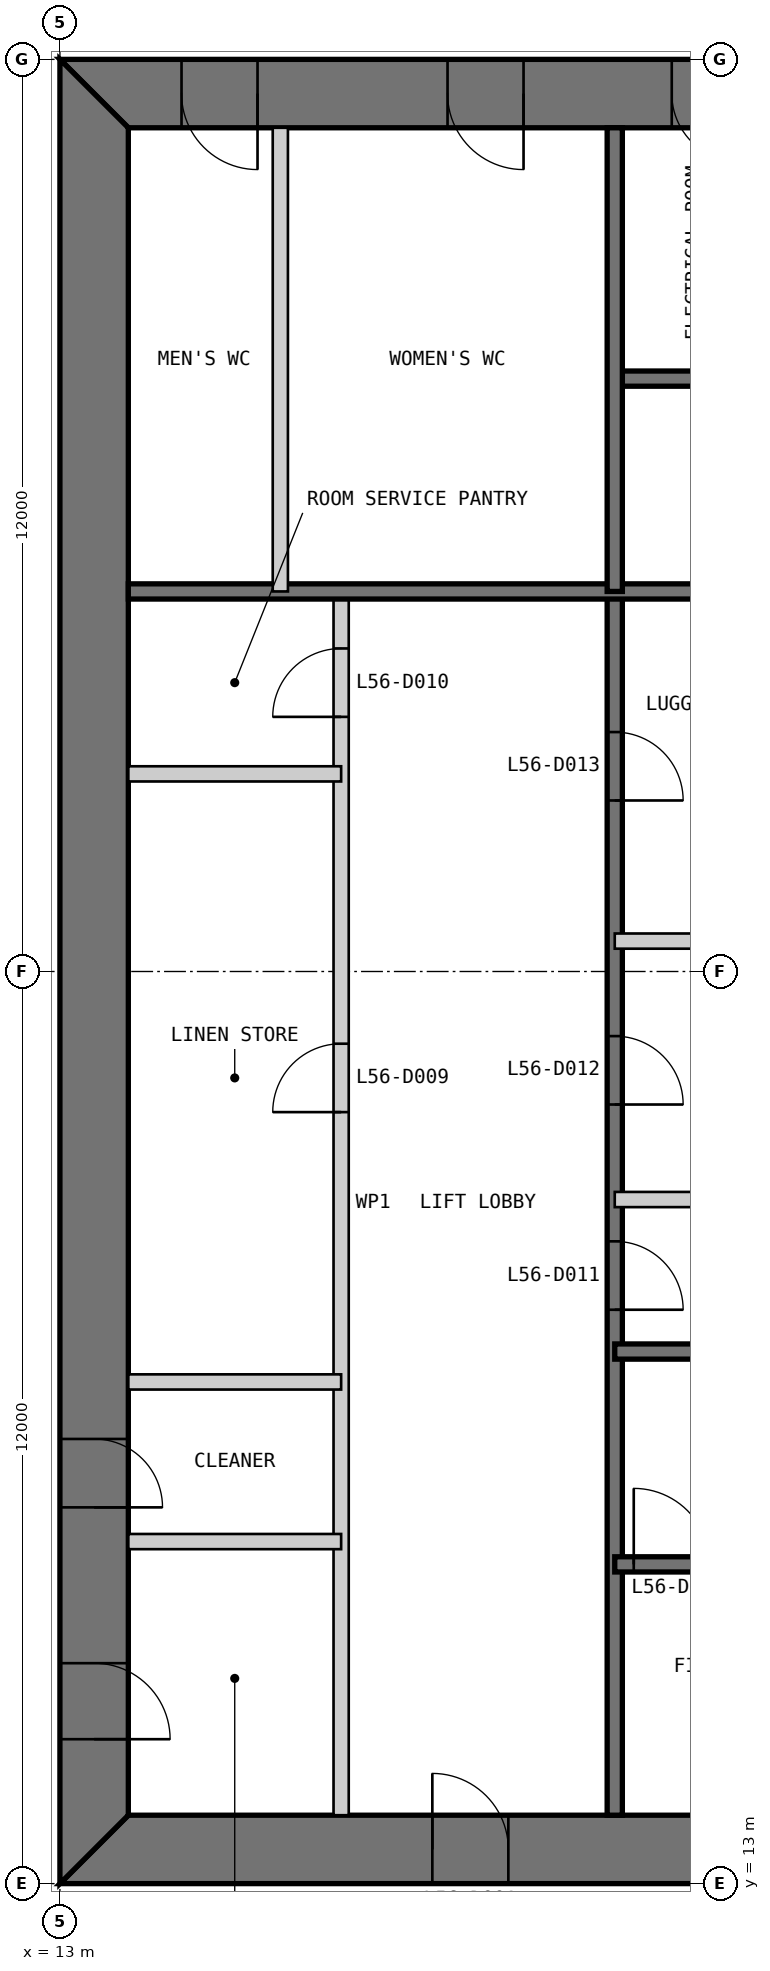
"""IFC4 building model, lengths in metres.
Left out: names, types, materials, properties, quantities, classifications, styles, units other than length and angle.
Written with IfcOpenShell. Run it as: python <this file> out.ifc"""

import sys

from ifc_helpers import new_model, si_unit, direction, frame, frame_2d, origin, place, context, subcontext, project, spatial, polyline, rectangle, outline, extrude, element, fill, save


model = new_model("IFC4")
c1 = context("Model", 3, precision=1e-05, world=origin(), true_north=direction((0.0, 1.0)))
c2 = subcontext(c1, "Body", "Model", "MODEL_VIEW")
j1 = project(units=[si_unit("LENGTHUNIT", "METRE"), si_unit("PLANEANGLEUNIT", "RADIAN")], contexts=[c1])
p1 = place(None, origin())
s1 = spatial("IfcSite", under=j1, at=p1, CompositionType="ELEMENT")
p2 = place(p1, origin())
s2 = spatial("IfcBuilding", under=s1, at=p2, CompositionType="ELEMENT")
p3 = place(p2, frame((0.0, 0.0, 239.8)))
s3 = spatial("IfcBuildingStorey", under=s2, at=p3, CompositionType="ELEMENT", Elevation=239.8)
p4 = place(p3, frame((13.0, 13.45, 0.0), z_axis=(0.0, 0.0, 1.0), x_axis=(1.0, 0.0, 0.0)))
e1 = element("IfcWall", 1, at=p4, inside=s3, PredefinedType="SHEAR", context=c2, shape_type="SweptSolid", body=[
    extrude(outline(polyline([(0.0, -0.45), (24.0, -0.45), (23.1, 0.45), (0.9, 0.45), (0.0, -0.45)])), origin(), (0.0, 0.0, 1.0), 6.0),
])
p5 = place(p4, frame((4.9, 0.0, 0.0)))
e2 = element("IfcOpeningElement", 2, at=p5, cuts=e1, PredefinedType="OPENING", context=c2, shape_type="SweptSolid", body=[
    extrude(rectangle(XDim=1.0, YDim=2.2, at=frame_2d((0.5, 1.1))), frame((0.0, 0.46, 0.0), z_axis=(0.0, -1.0, 0.0), x_axis=(1.0, 0.0, 0.0)), (0.0, 0.0, 1.0), 0.92),
])
p6 = place(p4, frame((8.9, 0.0, 0.0)))
e3 = element("IfcOpeningElement", 3, at=p6, cuts=e1, PredefinedType="OPENING", context=c2, shape_type="SweptSolid", body=[
    extrude(rectangle(XDim=1.1, YDim=2.2, at=frame_2d((0.55, 1.1))), frame((0.0, 0.46, 0.0), z_axis=(0.0, -1.0, 0.0), x_axis=(1.0, 0.0, 0.0)), (0.0, 0.0, 1.0), 0.92),
])
p7 = place(p4, frame((15.05, 0.0, 0.0)))
e4 = element("IfcOpeningElement", 4, at=p7, cuts=e1, PredefinedType="OPENING", context=c2, shape_type="SweptSolid", body=[
    extrude(rectangle(XDim=0.9, YDim=2.2, at=frame_2d((0.45, 1.1))), frame((0.0, 0.46, 0.0), z_axis=(0.0, -1.0, 0.0), x_axis=(1.0, 0.0, 0.0)), (0.0, 0.0, 1.0), 0.92),
])
p8 = place(p4, frame((17.9, 0.0, 0.0)))
e5 = element("IfcOpeningElement", 5, at=p8, cuts=e1, PredefinedType="OPENING", context=c2, shape_type="SweptSolid", body=[
    extrude(rectangle(XDim=1.0, YDim=2.2, at=frame_2d((0.5, 1.1))), frame((0.0, 0.46, 0.0), z_axis=(0.0, -1.0, 0.0), x_axis=(1.0, 0.0, 0.0)), (0.0, 0.0, 1.0), 0.92),
])
p9 = place(p4, frame((21.4, 0.0, 0.0)))
e6 = element("IfcOpeningElement", 6, at=p9, cuts=e1, PredefinedType="OPENING", context=c2, shape_type="SweptSolid", body=[
    extrude(rectangle(XDim=1.0, YDim=2.2, at=frame_2d((0.5, 1.1))), frame((0.0, 0.46, 0.0), z_axis=(0.0, -1.0, 0.0), x_axis=(1.0, 0.0, 0.0)), (0.0, 0.0, 1.0), 0.92),
])
p10 = place(p3, frame((37.0, 36.55, 0.0), z_axis=(0.0, 0.0, 1.0), x_axis=(-1.0, 0.0, 0.0)))
e7 = element("IfcWall", 7, at=p10, inside=s3, PredefinedType="SHEAR", context=c2, shape_type="SweptSolid", body=[
    extrude(outline(polyline([(0.0, -0.45), (24.0, -0.45), (23.1, 0.45), (0.9, 0.45), (0.0, -0.45)])), origin(), (0.0, 0.0, 1.0), 6.0),
])
p11 = place(p10, frame((4.9, 0.0, 0.0)))
e8 = element("IfcOpeningElement", 8, at=p11, cuts=e7, PredefinedType="OPENING", context=c2, shape_type="SweptSolid", body=[
    extrude(rectangle(XDim=1.0, YDim=2.2, at=frame_2d((0.5, 1.1))), frame((0.0, 0.46, 0.0), z_axis=(0.0, -1.0, 0.0), x_axis=(1.0, 0.0, 0.0)), (0.0, 0.0, 1.0), 0.92),
])
p12 = place(p10, frame((8.9, 0.0, 0.0)))
e9 = element("IfcOpeningElement", 9, at=p12, cuts=e7, PredefinedType="OPENING", context=c2, shape_type="SweptSolid", body=[
    extrude(rectangle(XDim=1.1, YDim=2.2, at=frame_2d((0.55, 1.1))), frame((0.0, 0.46, 0.0), z_axis=(0.0, -1.0, 0.0), x_axis=(1.0, 0.0, 0.0)), (0.0, 0.0, 1.0), 0.92),
])
p13 = place(p10, frame((15.05, 0.0, 0.0)))
e10 = element("IfcOpeningElement", 10, at=p13, cuts=e7, PredefinedType="OPENING", context=c2, shape_type="SweptSolid", body=[
    extrude(rectangle(XDim=0.9, YDim=2.2, at=frame_2d((0.45, 1.1))), frame((0.0, 0.46, 0.0), z_axis=(0.0, -1.0, 0.0), x_axis=(1.0, 0.0, 0.0)), (0.0, 0.0, 1.0), 0.92),
])
p14 = place(p10, frame((17.9, 0.0, 0.0)))
e11 = element("IfcOpeningElement", 11, at=p14, cuts=e7, PredefinedType="OPENING", context=c2, shape_type="SweptSolid", body=[
    extrude(rectangle(XDim=1.0, YDim=2.2, at=frame_2d((0.5, 1.1))), frame((0.0, 0.46, 0.0), z_axis=(0.0, -1.0, 0.0), x_axis=(1.0, 0.0, 0.0)), (0.0, 0.0, 1.0), 0.92),
])
p15 = place(p10, frame((21.4, 0.0, 0.0)))
e12 = element("IfcOpeningElement", 12, at=p15, cuts=e7, PredefinedType="OPENING", context=c2, shape_type="SweptSolid", body=[
    extrude(rectangle(XDim=1.0, YDim=2.2, at=frame_2d((0.5, 1.1))), frame((0.0, 0.46, 0.0), z_axis=(0.0, -1.0, 0.0), x_axis=(1.0, 0.0, 0.0)), (0.0, 0.0, 1.0), 0.92),
])
p16 = place(p3, frame((13.45, 36.1, 0.0), z_axis=(0.0, 0.0, 1.0), x_axis=(0.0, -1.0, 0.0)))
e13 = element("IfcWall", 13, at=p16, inside=s3, PredefinedType="SHEAR", context=c2, shape_type="SweptSolid", body=[
    extrude(outline(polyline([(-0.9, -0.45), (23.1, -0.45), (22.2, 0.45), (0.0, 0.45), (-0.9, -0.45)])), origin(), (0.0, 0.0, 1.0), 6.0),
])
p17 = place(p16, frame((20.2, 0.0, 0.0)))
e14 = element("IfcOpeningElement", 14, at=p17, cuts=e13, PredefinedType="OPENING", context=c2, shape_type="SweptSolid", body=[
    extrude(rectangle(XDim=1.0, YDim=2.2, at=frame_2d((0.5, 1.1))), frame((0.0, 0.46, 0.0), z_axis=(0.0, -1.0, 0.0), x_axis=(1.0, 0.0, 0.0)), (0.0, 0.0, 1.0), 0.92),
])
p18 = place(p16, frame((17.25, 0.0, 0.0)))
e15 = element("IfcOpeningElement", 15, at=p18, cuts=e13, PredefinedType="OPENING", context=c2, shape_type="SweptSolid", body=[
    extrude(rectangle(XDim=0.9, YDim=2.2, at=frame_2d((0.45, 1.1))), frame((0.0, 0.46, 0.0), z_axis=(0.0, -1.0, 0.0), x_axis=(1.0, 0.0, 0.0)), (0.0, 0.0, 1.0), 0.92),
])
p19 = place(p3, frame((16.7, 13.9, 0.0), z_axis=(0.0, 0.0, 1.0), x_axis=(0.0, 1.0, 0.0)))
e16 = element("IfcWall", 16, at=p19, inside=s3, PredefinedType="PARTITIONING", context=c2, shape_type="SweptSolid", body=[
    extrude(rectangle(XDim=16.1, YDim=0.2, at=frame_2d((8.05, 0.0))), origin(), (0.0, 0.0, 1.0), 5.8),
])
p20 = place(p19, frame((9.25, 0.0, 0.0)))
e17 = element("IfcOpeningElement", 17, at=p20, cuts=e16, PredefinedType="OPENING", context=c2, shape_type="SweptSolid", body=[
    extrude(rectangle(XDim=0.9, YDim=2.2, at=frame_2d((0.45, 1.1))), frame((0.0, 0.11, 0.0), z_axis=(0.0, -1.0, 0.0), x_axis=(1.0, 0.0, 0.0)), (0.0, 0.0, 1.0), 0.22),
])
p21 = place(p19, frame((14.45, 0.0, 0.0)))
e18 = element("IfcOpeningElement", 18, at=p21, cuts=e16, PredefinedType="OPENING", context=c2, shape_type="SweptSolid", body=[
    extrude(rectangle(XDim=0.9, YDim=2.2, at=frame_2d((0.45, 1.1))), frame((0.0, 0.11, 0.0), z_axis=(0.0, -1.0, 0.0), x_axis=(1.0, 0.0, 0.0)), (0.0, 0.0, 1.0), 0.22),
])
p22 = place(p3, frame((20.3, 13.9, 0.0), z_axis=(0.0, 0.0, 1.0), x_axis=(0.0, 1.0, 0.0)))
e19 = element("IfcWall", 19, at=p22, inside=s3, PredefinedType="SOLIDWALL", context=c2, shape_type="SweptSolid", body=[
    extrude(rectangle(XDim=16.1, YDim=0.2, at=frame_2d((8.05, 0.0))), origin(), (0.0, 0.0, 1.0), 5.8),
])
p23 = place(p22, frame((6.65, 0.0, 0.0)))
e20 = element("IfcOpeningElement", 20, at=p23, cuts=e19, PredefinedType="OPENING", context=c2, shape_type="SweptSolid", body=[
    extrude(rectangle(XDim=0.9, YDim=2.2, at=frame_2d((0.45, 1.1))), frame((0.0, 0.11, 0.0), z_axis=(0.0, -1.0, 0.0), x_axis=(1.0, 0.0, 0.0)), (0.0, 0.0, 1.0), 0.22),
])
p24 = place(p22, frame((9.35, 0.0, 0.0)))
e21 = element("IfcOpeningElement", 21, at=p24, cuts=e19, PredefinedType="OPENING", context=c2, shape_type="SweptSolid", body=[
    extrude(rectangle(XDim=0.9, YDim=2.2, at=frame_2d((0.45, 1.1))), frame((0.0, 0.11, 0.0), z_axis=(0.0, -1.0, 0.0), x_axis=(1.0, 0.0, 0.0)), (0.0, 0.0, 1.0), 0.22),
])
p25 = place(p22, frame((13.35, 0.0, 0.0)))
e22 = element("IfcOpeningElement", 22, at=p25, cuts=e19, PredefinedType="OPENING", context=c2, shape_type="SweptSolid", body=[
    extrude(rectangle(XDim=0.9, YDim=2.2, at=frame_2d((0.45, 1.1))), frame((0.0, 0.11, 0.0), z_axis=(0.0, -1.0, 0.0), x_axis=(1.0, 0.0, 0.0)), (0.0, 0.0, 1.0), 0.22),
])
p26 = place(p3, frame((20.3, 17.2, 0.0), z_axis=(0.0, 0.0, 1.0), x_axis=(1.0, 0.0, 0.0)))
e23 = element("IfcWall", 23, at=p26, inside=s3, PredefinedType="SOLIDWALL", context=c2, shape_type="SweptSolid", body=[
    extrude(rectangle(XDim=9.4, YDim=0.2, at=frame_2d((4.7, 0.0))), origin(), (0.0, 0.0, 1.0), 5.8),
])
p27 = place(p26, frame((0.25, 0.0, 0.0)))
e24 = element("IfcOpeningElement", 24, at=p27, cuts=e23, PredefinedType="OPENING", context=c2, shape_type="SweptSolid", body=[
    extrude(rectangle(XDim=1.0, YDim=2.2, at=frame_2d((0.5, 1.1))), frame((0.0, 0.11, 0.0), z_axis=(0.0, -1.0, 0.0), x_axis=(1.0, 0.0, 0.0)), (0.0, 0.0, 1.0), 0.22),
])
p28 = place(p3, frame((20.3, 20.0, 0.0), z_axis=(0.0, 0.0, 1.0), x_axis=(1.0, 0.0, 0.0)))
e25 = element("IfcWall", 25, at=p28, inside=s3, PredefinedType="SOLIDWALL", context=c2, shape_type="SweptSolid", body=[
    extrude(rectangle(XDim=15.8, YDim=0.2, at=frame_2d((7.9, 0.0))), origin(), (0.0, 0.0, 1.0), 5.8),
])
for number, where, z_axis, x_axis in (
    (26, (13.9, 17.5, 0.0), (0.0, 0.0, 1.0), (1.0, 0.0, 0.0)),
    (27, (13.9, 19.6, 0.0), (0.0, 0.0, 1.0), (1.0, 0.0, 0.0)),
    (28, (13.9, 27.6, 0.0), (0.0, 0.0, 1.0), (1.0, 0.0, 0.0)),
    (29, (20.3, 22.0, 0.0), (0.0, 0.0, 1.0), (1.0, 0.0, 0.0)),
    (30, (20.3, 25.4, 0.0), (0.0, 0.0, 1.0), (1.0, 0.0, 0.0)),
):
    element("IfcWall", number, at=place(p3, frame(where, z_axis=z_axis, x_axis=x_axis)), inside=s3, PredefinedType="PARTITIONING", context=c2, shape_type="SweptSolid", body=[
        extrude(rectangle(XDim=2.8, YDim=0.2, at=frame_2d((1.4, 0.0))), origin(), (0.0, 0.0, 1.0), 5.8),
    ])
p29 = place(p3, frame((29.7, 32.8, 0.0), z_axis=(0.0, 0.0, 1.0), x_axis=(-1.0, 0.0, 0.0)))
e31 = element("IfcWall", 31, at=p29, inside=s3, PredefinedType="SOLIDWALL", context=c2, shape_type="SweptSolid", body=[
    extrude(rectangle(XDim=9.4, YDim=0.2, at=frame_2d((4.7, 0.0))), origin(), (0.0, 0.0, 1.0), 5.8),
])
p30 = place(p29, frame((0.25, 0.0, 0.0)))
e32 = element("IfcOpeningElement", 32, at=p30, cuts=e31, PredefinedType="OPENING", context=c2, shape_type="SweptSolid", body=[
    extrude(rectangle(XDim=1.0, YDim=2.2, at=frame_2d((0.5, 1.1))), frame((0.0, 0.11, 0.0), z_axis=(0.0, -1.0, 0.0), x_axis=(1.0, 0.0, 0.0)), (0.0, 0.0, 1.0), 0.22),
])
p31 = place(p3, frame((29.7, 30.0, 0.0), z_axis=(0.0, 0.0, 1.0), x_axis=(-1.0, 0.0, 0.0)))
e33 = element("IfcWall", 33, at=p31, inside=s3, PredefinedType="SOLIDWALL", context=c2, shape_type="SweptSolid", body=[
    extrude(rectangle(XDim=15.8, YDim=0.2, at=frame_2d((7.9, 0.0))), origin(), (0.0, 0.0, 1.0), 5.8),
])
p32 = place(p3, frame((20.3, 36.1, 0.0), z_axis=(0.0, 0.0, 1.0), x_axis=(0.0, -1.0, 0.0)))
e34 = element("IfcWall", 34, at=p32, inside=s3, PredefinedType="SOLIDWALL", context=c2, shape_type="SweptSolid", body=[
    extrude(rectangle(XDim=6.1, YDim=0.2, at=frame_2d((3.05, 0.0))), origin(), (0.0, 0.0, 1.0), 5.8),
])
p33 = place(p3, frame((15.9, 36.1, 0.0), z_axis=(0.0, 0.0, 1.0), x_axis=(0.0, -1.0, 0.0)))
e35 = element("IfcWall", 35, at=p33, inside=s3, PredefinedType="PARTITIONING", context=c2, shape_type="SweptSolid", body=[
    extrude(rectangle(XDim=6.1, YDim=0.2, at=frame_2d((3.05, 0.0))), origin(), (0.0, 0.0, 1.0), 5.8),
])
p34 = place(p5, origin())
e36 = element("IfcDoor", 36, at=p34, inside=s3, OperationType="SINGLE_SWING_LEFT", PredefinedType="DOOR", context=c2, shape_type="SweptSolid", body=[
    extrude(rectangle(XDim=1.0, YDim=2.2, at=frame_2d((0.5, 1.1))), frame((0.0, 0.025, 0.0), z_axis=(0.0, -1.0, 0.0), x_axis=(1.0, 0.0, 0.0)), (0.0, 0.0, 1.0), 0.05),
    extrude(outline(polyline([(0.0, 0.0), (0.04, 0.0), (0.04, 2.16), (0.96, 2.16), (0.96, 0.0), (1.0, 0.0), (1.0, 2.2), (0.0, 2.2), (0.0, 0.0)])), frame((0.0, 0.3, 0.0), z_axis=(0.0, -1.0, 0.0), x_axis=(1.0, 0.0, 0.0)), (0.0, 0.0, 1.0), 0.6),
])
fill(e2, e36)
p35 = place(p27, origin())
e37 = element("IfcDoor", 37, at=p35, inside=s3, OperationType="SINGLE_SWING_LEFT", PredefinedType="DOOR", context=c2, shape_type="SweptSolid", body=[
    extrude(rectangle(XDim=1.0, YDim=2.2, at=frame_2d((0.5, 1.1))), frame((0.0, 0.025, 0.0), z_axis=(0.0, -1.0, 0.0), x_axis=(1.0, 0.0, 0.0)), (0.0, 0.0, 1.0), 0.05),
])
fill(e24, e37)
p36 = place(p17, origin())
e38 = element("IfcDoor", 38, at=p36, inside=s3, OperationType="SINGLE_SWING_RIGHT", PredefinedType="DOOR", context=c2, shape_type="SweptSolid", body=[
    extrude(rectangle(XDim=1.0, YDim=2.2, at=frame_2d((0.5, 1.1))), frame((0.0, 0.025, 0.0), z_axis=(0.0, -1.0, 0.0), x_axis=(1.0, 0.0, 0.0)), (0.0, 0.0, 1.0), 0.05),
    extrude(outline(polyline([(0.0, 0.0), (0.04, 0.0), (0.04, 2.16), (0.96, 2.16), (0.96, 0.0), (1.0, 0.0), (1.0, 2.2), (0.0, 2.2), (0.0, 0.0)])), frame((0.0, 0.3, 0.0), z_axis=(0.0, -1.0, 0.0), x_axis=(1.0, 0.0, 0.0)), (0.0, 0.0, 1.0), 0.6),
])
fill(e14, e38)
p37 = place(p18, origin())
e39 = element("IfcDoor", 39, at=p37, inside=s3, OperationType="SINGLE_SWING_RIGHT", PredefinedType="DOOR", context=c2, shape_type="SweptSolid", body=[
    extrude(rectangle(XDim=0.9, YDim=2.2, at=frame_2d((0.45, 1.1))), frame((0.0, 0.025, 0.0), z_axis=(0.0, -1.0, 0.0), x_axis=(1.0, 0.0, 0.0)), (0.0, 0.0, 1.0), 0.05),
    extrude(outline(polyline([(0.0, 0.0), (0.04, 0.0), (0.04, 2.16), (0.86, 2.16), (0.86, 0.0), (0.9, 0.0), (0.9, 2.2), (0.0, 2.2), (0.0, 0.0)])), frame((0.0, 0.3, 0.0), z_axis=(0.0, -1.0, 0.0), x_axis=(1.0, 0.0, 0.0)), (0.0, 0.0, 1.0), 0.6),
])
fill(e15, e39)
p38 = place(p20, origin())
e40 = element("IfcDoor", 40, at=p38, inside=s3, OperationType="SINGLE_SWING_LEFT", PredefinedType="DOOR", context=c2, shape_type="SweptSolid", body=[
    extrude(rectangle(XDim=0.9, YDim=2.2, at=frame_2d((0.45, 1.1))), frame((0.0, 0.025, 0.0), z_axis=(0.0, -1.0, 0.0), x_axis=(1.0, 0.0, 0.0)), (0.0, 0.0, 1.0), 0.05),
])
fill(e17, e40)
p39 = place(p21, origin())
e41 = element("IfcDoor", 41, at=p39, inside=s3, OperationType="SINGLE_SWING_LEFT", PredefinedType="DOOR", context=c2, shape_type="SweptSolid", body=[
    extrude(rectangle(XDim=0.9, YDim=2.2, at=frame_2d((0.45, 1.1))), frame((0.0, 0.025, 0.0), z_axis=(0.0, -1.0, 0.0), x_axis=(1.0, 0.0, 0.0)), (0.0, 0.0, 1.0), 0.05),
])
fill(e18, e41)
p40 = place(p23, frame((0.9, 0.0, 0.0), z_axis=(0.0, 0.0, 1.0), x_axis=(-1.0, 0.0, 0.0)))
e42 = element("IfcDoor", 42, at=p40, inside=s3, OperationType="SINGLE_SWING_RIGHT", PredefinedType="DOOR", context=c2, shape_type="SweptSolid", body=[
    extrude(rectangle(XDim=0.9, YDim=2.2, at=frame_2d((0.45, 1.1))), frame((0.0, 0.025, 0.0), z_axis=(0.0, -1.0, 0.0), x_axis=(1.0, 0.0, 0.0)), (0.0, 0.0, 1.0), 0.05),
])
fill(e20, e42)
p41 = place(p24, frame((0.9, 0.0, 0.0), z_axis=(0.0, 0.0, 1.0), x_axis=(-1.0, 0.0, 0.0)))
e43 = element("IfcDoor", 43, at=p41, inside=s3, OperationType="SINGLE_SWING_RIGHT", PredefinedType="DOOR", context=c2, shape_type="SweptSolid", body=[
    extrude(rectangle(XDim=0.9, YDim=2.2, at=frame_2d((0.45, 1.1))), frame((0.0, 0.025, 0.0), z_axis=(0.0, -1.0, 0.0), x_axis=(1.0, 0.0, 0.0)), (0.0, 0.0, 1.0), 0.05),
])
fill(e21, e43)
p42 = place(p25, frame((0.9, 0.0, 0.0), z_axis=(0.0, 0.0, 1.0), x_axis=(-1.0, 0.0, 0.0)))
e44 = element("IfcDoor", 44, at=p42, inside=s3, OperationType="SINGLE_SWING_RIGHT", PredefinedType="DOOR", context=c2, shape_type="SweptSolid", body=[
    extrude(rectangle(XDim=0.9, YDim=2.2, at=frame_2d((0.45, 1.1))), frame((0.0, 0.025, 0.0), z_axis=(0.0, -1.0, 0.0), x_axis=(1.0, 0.0, 0.0)), (0.0, 0.0, 1.0), 0.05),
])
fill(e22, e44)
p43 = place(p13, origin())
e45 = element("IfcDoor", 45, at=p43, inside=s3, OperationType="SINGLE_SWING_LEFT", PredefinedType="DOOR", context=c2, shape_type="SweptSolid", body=[
    extrude(rectangle(XDim=0.9, YDim=2.2, at=frame_2d((0.45, 1.1))), frame((0.0, 0.025, 0.0), z_axis=(0.0, -1.0, 0.0), x_axis=(1.0, 0.0, 0.0)), (0.0, 0.0, 1.0), 0.05),
    extrude(outline(polyline([(0.0, 0.0), (0.04, 0.0), (0.04, 2.16), (0.86, 2.16), (0.86, 0.0), (0.9, 0.0), (0.9, 2.2), (0.0, 2.2), (0.0, 0.0)])), frame((0.0, 0.3, 0.0), z_axis=(0.0, -1.0, 0.0), x_axis=(1.0, 0.0, 0.0)), (0.0, 0.0, 1.0), 0.6),
])
fill(e10, e45)
p44 = place(p14, origin())
e46 = element("IfcDoor", 46, at=p44, inside=s3, OperationType="SINGLE_SWING_LEFT", PredefinedType="DOOR", context=c2, shape_type="SweptSolid", body=[
    extrude(rectangle(XDim=1.0, YDim=2.2, at=frame_2d((0.5, 1.1))), frame((0.0, 0.025, 0.0), z_axis=(0.0, -1.0, 0.0), x_axis=(1.0, 0.0, 0.0)), (0.0, 0.0, 1.0), 0.05),
    extrude(outline(polyline([(0.0, 0.0), (0.04, 0.0), (0.04, 2.16), (0.96, 2.16), (0.96, 0.0), (1.0, 0.0), (1.0, 2.2), (0.0, 2.2), (0.0, 0.0)])), frame((0.0, 0.3, 0.0), z_axis=(0.0, -1.0, 0.0), x_axis=(1.0, 0.0, 0.0)), (0.0, 0.0, 1.0), 0.6),
])
fill(e11, e46)
p45 = place(p15, origin())
e47 = element("IfcDoor", 47, at=p45, inside=s3, OperationType="SINGLE_SWING_LEFT", PredefinedType="DOOR", context=c2, shape_type="SweptSolid", body=[
    extrude(rectangle(XDim=1.0, YDim=2.2, at=frame_2d((0.5, 1.1))), frame((0.0, 0.025, 0.0), z_axis=(0.0, -1.0, 0.0), x_axis=(1.0, 0.0, 0.0)), (0.0, 0.0, 1.0), 0.05),
    extrude(outline(polyline([(0.0, 0.0), (0.04, 0.0), (0.04, 2.16), (0.96, 2.16), (0.96, 0.0), (1.0, 0.0), (1.0, 2.2), (0.0, 2.2), (0.0, 0.0)])), frame((0.0, 0.3, 0.0), z_axis=(0.0, -1.0, 0.0), x_axis=(1.0, 0.0, 0.0)), (0.0, 0.0, 1.0), 0.6),
])
fill(e12, e47)
save(model, sys.argv[1])
